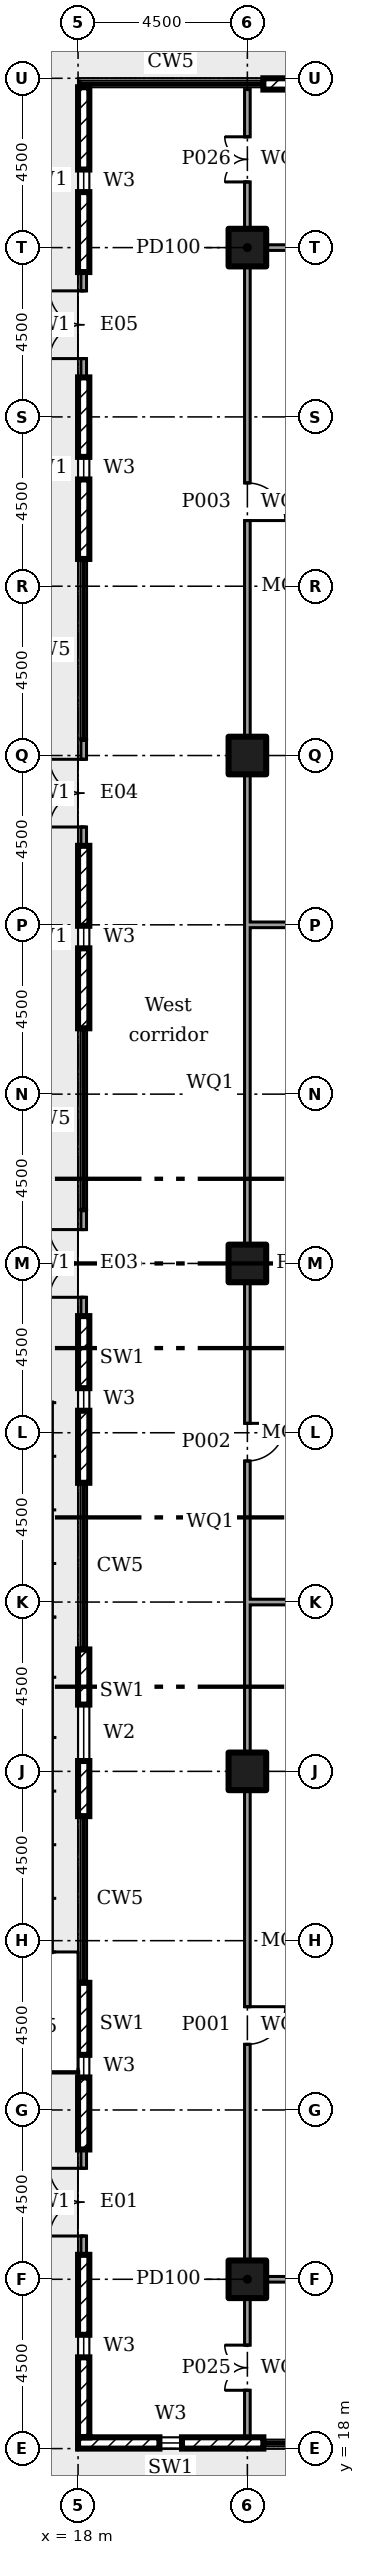
"""IFC4 building model, lengths in metres.
Left out: names, types, materials, properties, quantities, classifications, styles, units other than length and angle.
Written with IfcOpenShell. Run it as: python <this file> out.ifc"""

import sys

from ifc_helpers import new_model, si_unit, direction, frame, frame_2d, origin, origin_2d, place, context, subcontext, project, spatial, rectangle, extrude, element, fill, save


model = new_model("IFC4")
c1 = context("Model", 3, precision=1e-05, world=origin(), true_north=direction((0.0, 1.0)))
c2 = subcontext(c1, "Body", "Model", "MODEL_VIEW")
j1 = project(units=[si_unit("LENGTHUNIT", "METRE"), si_unit("PLANEANGLEUNIT", "RADIAN")], contexts=[c1])
p1 = place(None, origin())
s1 = spatial("IfcSite", under=j1, at=p1, CompositionType="ELEMENT")
p2 = place(p1, origin())
s2 = spatial("IfcBuilding", under=s1, at=p2, CompositionType="ELEMENT")
p3 = place(p2, frame((0.0, 0.0, 11.5)))
s3 = spatial("IfcBuildingStorey", under=s2, at=p3, CompositionType="ELEMENT", Elevation=11.5)
for number, where in (
    (1, (22.5, 22.5, 0.0)),
    (2, (22.5, 36.0, 0.0)),
    (3, (22.5, 49.5, 0.0)),
    (4, (22.5, 63.0, 0.0)),
    (5, (22.5, 76.5, 0.0)),
):
    element("IfcColumn", number, at=place(p3, frame(where)), inside=s3, PredefinedType="COLUMN", context=c2, shape_type="SweptSolid", body=[
        extrude(rectangle(XDim=1.0, YDim=1.0, at=origin_2d()), origin(), (0.0, 0.0, 1.0), 5.0),
    ])
p4 = place(p3, frame((18.0, 18.15, 0.0)))
e6 = element("IfcWall", 6, at=p4, inside=s3, PredefinedType="ELEMENTEDWALL", context=c2, shape_type="SweptSolid", body=[
    extrude(rectangle(XDim=4.925, YDim=0.3, at=frame_2d((2.462, 0.0))), origin(), (0.0, 0.0, 1.0), 4.55),
])
p5 = place(p4, frame((2.163, 0.0, 0.45)))
e7 = element("IfcOpeningElement", 7, at=p5, cuts=e6, PredefinedType="OPENING", context=c2, shape_type="SweptSolid", body=[
    extrude(rectangle(XDim=0.6, YDim=2.4, at=frame_2d((0.3, 1.2))), frame((0.0, 0.16, 0.0), z_axis=(0.0, -1.0, 0.0), x_axis=(1.0, 0.0, 0.0)), (0.0, 0.0, 1.0), 0.32),
])
p6 = place(p3, frame((27.85, 80.85, 0.0), z_axis=(0.0, 0.0, 1.0), x_axis=(-1.0, 0.0, 0.0)))
e8 = element("IfcWall", 8, at=p6, inside=s3, PredefinedType="ELEMENTEDWALL", context=c2, shape_type="SweptSolid", body=[
    extrude(rectangle(XDim=4.925, YDim=0.3, at=frame_2d((2.462, 0.0))), origin(), (0.0, 0.0, 1.0), 4.55),
])
p7 = place(p6, frame((2.163, 0.0, 0.45)))
e9 = element("IfcOpeningElement", 9, at=p7, cuts=e8, PredefinedType="OPENING", context=c2, shape_type="SweptSolid", body=[
    extrude(rectangle(XDim=0.6, YDim=2.4, at=frame_2d((0.3, 1.2))), frame((0.0, 0.16, 0.0), z_axis=(0.0, -1.0, 0.0), x_axis=(1.0, 0.0, 0.0)), (0.0, 0.0, 1.0), 0.32),
])
p8 = place(p3, frame((18.15, 80.762, 0.0), z_axis=(0.0, 0.0, 1.0), x_axis=(0.0, -1.0, 0.0)))
e10 = element("IfcWall", 10, at=p8, inside=s3, PredefinedType="ELEMENTEDWALL", context=c2, shape_type="SweptSolid", body=[
    extrude(rectangle(XDim=4.912, YDim=0.3, at=frame_2d((2.456, 0.0))), origin(), (0.0, 0.0, 1.0), 4.55),
])
p9 = place(p8, frame((2.188, 0.0, 0.45)))
e11 = element("IfcOpeningElement", 11, at=p9, cuts=e10, PredefinedType="OPENING", context=c2, shape_type="SweptSolid", body=[
    extrude(rectangle(XDim=0.6, YDim=2.4, at=frame_2d((0.3, 1.2))), frame((0.0, 0.16, 0.0), z_axis=(0.0, -1.0, 0.0), x_axis=(1.0, 0.0, 0.0)), (0.0, 0.0, 1.0), 0.32),
])
p10 = place(p3, frame((18.15, 75.85, 0.0), z_axis=(0.0, 0.0, 1.0), x_axis=(0.0, -1.0, 0.0)))
e12 = element("IfcWall", 12, at=p10, inside=s3, PredefinedType="SOLIDWALL", context=c2, shape_type="SweptSolid", body=[
    extrude(rectangle(XDim=2.8, YDim=0.15, at=frame_2d((1.4, 0.0))), origin(), (0.0, 0.0, 1.0), 4.55),
])
p11 = place(p10, frame((0.5, 0.0, 0.0)))
e13 = element("IfcOpeningElement", 13, at=p11, cuts=e12, PredefinedType="OPENING", context=c2, shape_type="SweptSolid", body=[
    extrude(rectangle(XDim=1.8, YDim=2.4, at=frame_2d((0.9, 1.2))), frame((0.0, 0.085, 0.0), z_axis=(0.0, -1.0, 0.0), x_axis=(1.0, 0.0, 0.0)), (0.0, 0.0, 1.0), 0.17),
])
p12 = place(p3, frame((18.15, 73.05, 0.0), z_axis=(0.0, 0.0, 1.0), x_axis=(0.0, -1.0, 0.0)))
e14 = element("IfcWall", 14, at=p12, inside=s3, PredefinedType="ELEMENTEDWALL", context=c2, shape_type="SweptSolid", body=[
    extrude(rectangle(XDim=4.825, YDim=0.3, at=frame_2d((2.413, 0.0))), origin(), (0.0, 0.0, 1.0), 4.55),
])
p13 = place(p12, frame((2.113, 0.0, 0.45)))
e15 = element("IfcOpeningElement", 15, at=p13, cuts=e14, PredefinedType="OPENING", context=c2, shape_type="SweptSolid", body=[
    extrude(rectangle(XDim=0.6, YDim=2.4, at=frame_2d((0.3, 1.2))), frame((0.0, 0.16, 0.0), z_axis=(0.0, -1.0, 0.0), x_axis=(1.0, 0.0, 0.0)), (0.0, 0.0, 1.0), 0.32),
])
p14 = place(p3, frame((18.15, 63.4, 0.0), z_axis=(0.0, 0.0, 1.0), x_axis=(0.0, -1.0, 0.0)))
e16 = element("IfcWall", 16, at=p14, inside=s3, PredefinedType="SOLIDWALL", context=c2, shape_type="SweptSolid", body=[
    extrude(rectangle(XDim=2.8, YDim=0.15, at=frame_2d((1.4, 0.0))), origin(), (0.0, 0.0, 1.0), 4.55),
])
p15 = place(p14, frame((0.5, 0.0, 0.0)))
e17 = element("IfcOpeningElement", 17, at=p15, cuts=e16, PredefinedType="OPENING", context=c2, shape_type="SweptSolid", body=[
    extrude(rectangle(XDim=1.8, YDim=2.4, at=frame_2d((0.9, 1.2))), frame((0.0, 0.085, 0.0), z_axis=(0.0, -1.0, 0.0), x_axis=(1.0, 0.0, 0.0)), (0.0, 0.0, 1.0), 0.17),
])
p16 = place(p3, frame((18.15, 60.6, 0.0), z_axis=(0.0, 0.0, 1.0), x_axis=(0.0, -1.0, 0.0)))
e18 = element("IfcWall", 18, at=p16, inside=s3, PredefinedType="ELEMENTEDWALL", context=c2, shape_type="SweptSolid", body=[
    extrude(rectangle(XDim=4.85, YDim=0.3, at=frame_2d((2.425, 0.0))), origin(), (0.0, 0.0, 1.0), 4.55),
])
p17 = place(p16, frame((2.125, 0.0, 0.45)))
e19 = element("IfcOpeningElement", 19, at=p17, cuts=e18, PredefinedType="OPENING", context=c2, shape_type="SweptSolid", body=[
    extrude(rectangle(XDim=0.6, YDim=2.4, at=frame_2d((0.3, 1.2))), frame((0.0, 0.16, 0.0), z_axis=(0.0, -1.0, 0.0), x_axis=(1.0, 0.0, 0.0)), (0.0, 0.0, 1.0), 0.32),
])
p18 = place(p3, frame((18.15, 50.9, 0.0), z_axis=(0.0, 0.0, 1.0), x_axis=(0.0, -1.0, 0.0)))
e20 = element("IfcWall", 20, at=p18, inside=s3, PredefinedType="SOLIDWALL", context=c2, shape_type="SweptSolid", body=[
    extrude(rectangle(XDim=2.8, YDim=0.15, at=frame_2d((1.4, 0.0))), origin(), (0.0, 0.0, 1.0), 4.55),
])
p19 = place(p18, frame((0.5, 0.0, 0.0)))
e21 = element("IfcOpeningElement", 21, at=p19, cuts=e20, PredefinedType="OPENING", context=c2, shape_type="SweptSolid", body=[
    extrude(rectangle(XDim=1.8, YDim=2.4, at=frame_2d((0.9, 1.2))), frame((0.0, 0.085, 0.0), z_axis=(0.0, -1.0, 0.0), x_axis=(1.0, 0.0, 0.0)), (0.0, 0.0, 1.0), 0.17),
])
p20 = place(p3, frame((18.15, 48.1, 0.0), z_axis=(0.0, 0.0, 1.0), x_axis=(0.0, -1.0, 0.0)))
e22 = element("IfcWall", 22, at=p20, inside=s3, PredefinedType="ELEMENTEDWALL", context=c2, shape_type="SweptSolid", body=[
    extrude(rectangle(XDim=4.43, YDim=0.3, at=frame_2d((2.215, 0.0))), origin(), (0.0, 0.0, 1.0), 4.55),
])
p21 = place(p20, frame((1.915, 0.0, 0.45)))
e23 = element("IfcOpeningElement", 23, at=p21, cuts=e22, PredefinedType="OPENING", context=c2, shape_type="SweptSolid", body=[
    extrude(rectangle(XDim=0.6, YDim=2.4, at=frame_2d((0.3, 1.2))), frame((0.0, 0.16, 0.0), z_axis=(0.0, -1.0, 0.0), x_axis=(1.0, 0.0, 0.0)), (0.0, 0.0, 1.0), 0.32),
])
p22 = place(p3, frame((18.15, 39.24, 0.0), z_axis=(0.0, 0.0, 1.0), x_axis=(0.0, -1.0, 0.0)))
e24 = element("IfcWall", 24, at=p22, inside=s3, PredefinedType="ELEMENTEDWALL", context=c2, shape_type="SweptSolid", body=[
    extrude(rectangle(XDim=4.43, YDim=0.3, at=frame_2d((2.215, 0.0))), origin(), (0.0, 0.0, 1.0), 4.55),
])
p23 = place(p22, frame((1.465, 0.0, 0.9)))
e25 = element("IfcOpeningElement", 25, at=p23, cuts=e24, PredefinedType="OPENING", context=c2, shape_type="SweptSolid", body=[
    extrude(rectangle(XDim=1.5, YDim=1.8, at=frame_2d((0.75, 0.9))), frame((0.0, 0.16, 0.0), z_axis=(0.0, -1.0, 0.0), x_axis=(1.0, 0.0, 0.0)), (0.0, 0.0, 1.0), 0.32),
])
p24 = place(p3, frame((18.15, 30.38, 0.0), z_axis=(0.0, 0.0, 1.0), x_axis=(0.0, -1.0, 0.0)))
e26 = element("IfcWall", 26, at=p24, inside=s3, PredefinedType="ELEMENTEDWALL", context=c2, shape_type="SweptSolid", body=[
    extrude(rectangle(XDim=4.43, YDim=0.3, at=frame_2d((2.215, 0.0))), origin(), (0.0, 0.0, 1.0), 4.55),
])
p25 = place(p24, frame((1.915, 0.0, 0.45)))
e27 = element("IfcOpeningElement", 27, at=p25, cuts=e26, PredefinedType="OPENING", context=c2, shape_type="SweptSolid", body=[
    extrude(rectangle(XDim=0.6, YDim=2.4, at=frame_2d((0.3, 1.2))), frame((0.0, 0.16, 0.0), z_axis=(0.0, -1.0, 0.0), x_axis=(1.0, 0.0, 0.0)), (0.0, 0.0, 1.0), 0.32),
])
p26 = place(p3, frame((18.15, 25.95, 0.0), z_axis=(0.0, 0.0, 1.0), x_axis=(0.0, -1.0, 0.0)))
e28 = element("IfcWall", 28, at=p26, inside=s3, PredefinedType="SOLIDWALL", context=c2, shape_type="SweptSolid", body=[
    extrude(rectangle(XDim=2.8, YDim=0.15, at=frame_2d((1.4, 0.0))), origin(), (0.0, 0.0, 1.0), 4.55),
])
p27 = place(p26, frame((0.5, 0.0, 0.0)))
e29 = element("IfcOpeningElement", 29, at=p27, cuts=e28, PredefinedType="OPENING", context=c2, shape_type="SweptSolid", body=[
    extrude(rectangle(XDim=1.8, YDim=2.4, at=frame_2d((0.9, 1.2))), frame((0.0, 0.085, 0.0), z_axis=(0.0, -1.0, 0.0), x_axis=(1.0, 0.0, 0.0)), (0.0, 0.0, 1.0), 0.17),
])
p28 = place(p3, frame((18.15, 23.15, 0.0), z_axis=(0.0, 0.0, 1.0), x_axis=(0.0, -1.0, 0.0)))
e30 = element("IfcWall", 30, at=p28, inside=s3, PredefinedType="ELEMENTEDWALL", context=c2, shape_type="SweptSolid", body=[
    extrude(rectangle(XDim=4.85, YDim=0.3, at=frame_2d((2.425, 0.0))), origin(), (0.0, 0.0, 1.0), 4.55),
])
p29 = place(p28, frame((2.125, 0.0, 0.45)))
e31 = element("IfcOpeningElement", 31, at=p29, cuts=e30, PredefinedType="OPENING", context=c2, shape_type="SweptSolid", body=[
    extrude(rectangle(XDim=0.6, YDim=2.4, at=frame_2d((0.3, 1.2))), frame((0.0, 0.16, 0.0), z_axis=(0.0, -1.0, 0.0), x_axis=(1.0, 0.0, 0.0)), (0.0, 0.0, 1.0), 0.32),
])
p30 = place(p3, frame((22.5, 18.3, 0.0), z_axis=(0.0, 0.0, 1.0), x_axis=(0.0, 1.0, 0.0)))
e32 = element("IfcWall", 32, at=p30, inside=s3, PredefinedType="PARTITIONING", context=c2, shape_type="SweptSolid", body=[
    extrude(rectangle(XDim=3.705, YDim=0.15, at=frame_2d((1.853, 0.0))), origin(), (0.0, 0.0, 1.0), 4.55),
])
p31 = place(p30, frame((1.25, 0.0, 0.0)))
e33 = element("IfcOpeningElement", 33, at=p31, cuts=e32, PredefinedType="OPENING", context=c2, shape_type="SweptSolid", body=[
    extrude(rectangle(XDim=1.2, YDim=2.1, at=frame_2d((0.6, 1.05))), frame((0.0, 0.085, 0.0), z_axis=(0.0, -1.0, 0.0), x_axis=(1.0, 0.0, 0.0)), (0.0, 0.0, 1.0), 0.17),
])
p32 = place(p3, frame((22.5, 76.995, 0.0), z_axis=(0.0, 0.0, 1.0), x_axis=(0.0, 1.0, 0.0)))
e34 = element("IfcWall", 34, at=p32, inside=s3, PredefinedType="PARTITIONING", context=c2, shape_type="SweptSolid", body=[
    extrude(rectangle(XDim=3.705, YDim=0.15, at=frame_2d((1.853, 0.0))), origin(), (0.0, 0.0, 1.0), 4.55),
])
p33 = place(p32, frame((1.25, 0.0, 0.0)))
e35 = element("IfcOpeningElement", 35, at=p33, cuts=e34, PredefinedType="OPENING", context=c2, shape_type="SweptSolid", body=[
    extrude(rectangle(XDim=1.2, YDim=2.1, at=frame_2d((0.6, 1.05))), frame((0.0, 0.085, 0.0), z_axis=(0.0, -1.0, 0.0), x_axis=(1.0, 0.0, 0.0)), (0.0, 0.0, 1.0), 0.17),
])
p34 = place(p3, frame((22.5, 22.995, 0.0), z_axis=(0.0, 0.0, 1.0), x_axis=(0.0, 1.0, 0.0)))
e36 = element("IfcWall", 36, at=p34, inside=s3, PredefinedType="PARTITIONING", context=c2, shape_type="SweptSolid", body=[
    extrude(rectangle(XDim=12.51, YDim=0.15, at=frame_2d((6.255, 0.0))), origin(), (0.0, 0.0, 1.0), 4.55),
])
p35 = place(p34, frame((5.75, 0.0, 0.0)))
e37 = element("IfcOpeningElement", 37, at=p35, cuts=e36, PredefinedType="OPENING", context=c2, shape_type="SweptSolid", body=[
    extrude(rectangle(XDim=1.0, YDim=2.1, at=frame_2d((0.5, 1.05))), frame((0.0, 0.085, 0.0), z_axis=(0.0, -1.0, 0.0), x_axis=(1.0, 0.0, 0.0)), (0.0, 0.0, 1.0), 0.17),
])
p36 = place(p3, frame((22.5, 36.495, 0.0), z_axis=(0.0, 0.0, 1.0), x_axis=(0.0, 1.0, 0.0)))
e38 = element("IfcWall", 38, at=p36, inside=s3, PredefinedType="PARTITIONING", context=c2, shape_type="SweptSolid", body=[
    extrude(rectangle(XDim=4.08, YDim=0.15, at=frame_2d((2.04, 0.0))), origin(), (0.0, 0.0, 1.0), 4.55),
])
p37 = place(p3, frame((22.5, 40.5, 0.0), z_axis=(0.0, 0.0, 1.0), x_axis=(0.0, 1.0, 0.0)))
e39 = element("IfcWall", 39, at=p37, inside=s3, PredefinedType="PARTITIONING", context=c2, shape_type="SweptSolid", body=[
    extrude(rectangle(XDim=8.505, YDim=0.15, at=frame_2d((4.252, 0.0))), origin(), (0.0, 0.0, 1.0), 4.55),
])
p38 = place(p37, frame((3.75, 0.0, 0.0)))
e40 = element("IfcOpeningElement", 40, at=p38, cuts=e39, PredefinedType="OPENING", context=c2, shape_type="SweptSolid", body=[
    extrude(rectangle(XDim=1.0, YDim=2.1, at=frame_2d((0.5, 1.05))), frame((0.0, 0.085, 0.0), z_axis=(0.0, -1.0, 0.0), x_axis=(1.0, 0.0, 0.0)), (0.0, 0.0, 1.0), 0.17),
])
p39 = place(p3, frame((22.5, 49.995, 0.0), z_axis=(0.0, 0.0, 1.0), x_axis=(0.0, 1.0, 0.0)))
e41 = element("IfcWall", 41, at=p39, inside=s3, PredefinedType="PARTITIONING", context=c2, shape_type="SweptSolid", body=[
    extrude(rectangle(XDim=8.58, YDim=0.15, at=frame_2d((4.29, 0.0))), origin(), (0.0, 0.0, 1.0), 4.55),
])
p40 = place(p3, frame((22.5, 58.5, 0.0), z_axis=(0.0, 0.0, 1.0), x_axis=(0.0, 1.0, 0.0)))
e42 = element("IfcWall", 42, at=p40, inside=s3, PredefinedType="PARTITIONING", context=c2, shape_type="SweptSolid", body=[
    extrude(rectangle(XDim=4.005, YDim=0.15, at=frame_2d((2.002, 0.0))), origin(), (0.0, 0.0, 1.0), 4.55),
])
p41 = place(p3, frame((22.5, 63.495, 0.0), z_axis=(0.0, 0.0, 1.0), x_axis=(0.0, 1.0, 0.0)))
e43 = element("IfcWall", 43, at=p41, inside=s3, PredefinedType="PARTITIONING", context=c2, shape_type="SweptSolid", body=[
    extrude(rectangle(XDim=12.51, YDim=0.15, at=frame_2d((6.255, 0.0))), origin(), (0.0, 0.0, 1.0), 4.55),
])
p42 = place(p41, frame((5.75, 0.0, 0.0)))
e44 = element("IfcOpeningElement", 44, at=p42, cuts=e43, PredefinedType="OPENING", context=c2, shape_type="SweptSolid", body=[
    extrude(rectangle(XDim=1.0, YDim=2.1, at=frame_2d((0.5, 1.05))), frame((0.0, 0.085, 0.0), z_axis=(0.0, -1.0, 0.0), x_axis=(1.0, 0.0, 0.0)), (0.0, 0.0, 1.0), 0.17),
])
for number, where in (
    (45, (22.995, 22.5, 0.0)),
    (46, (22.995, 76.5, 0.0)),
):
    element("IfcWall", number, at=place(p3, frame(where)), inside=s3, PredefinedType="PARTITIONING", context=c2, shape_type="SweptSolid", body=[
        extrude(rectangle(XDim=4.08, YDim=0.15, at=frame_2d((2.04, 0.0))), origin(), (0.0, 0.0, 1.0), 4.55),
    ])
p43 = place(p3, frame((22.575, 40.5, 0.0)))
e47 = element("IfcWall", 47, at=p43, inside=s3, PredefinedType="PARTITIONING", context=c2, shape_type="SweptSolid", body=[
    extrude(rectangle(XDim=4.5, YDim=0.15, at=frame_2d((2.25, 0.0))), origin(), (0.0, 0.0, 1.0), 4.55),
])
p44 = place(p3, frame((22.575, 58.5, 0.0)))
e48 = element("IfcWall", 48, at=p44, inside=s3, PredefinedType="PARTITIONING", context=c2, shape_type="SweptSolid", body=[
    extrude(rectangle(XDim=3.13, YDim=0.15, at=frame_2d((1.565, 0.0))), origin(), (0.0, 0.0, 1.0), 4.55),
])
p45 = place(p5, origin())
e49 = element("IfcWindow", 49, at=p45, inside=s3, PartitioningType="SINGLE_PANEL", PredefinedType="WINDOW", context=c2, shape_type="SweptSolid", body=[
    extrude(rectangle(XDim=0.6, YDim=2.4, at=frame_2d((0.3, 1.2))), frame((0.0, 0.03, 0.0), z_axis=(0.0, -1.0, 0.0), x_axis=(1.0, 0.0, 0.0)), (0.0, 0.0, 1.0), 0.06),
])
fill(e7, e49)
p46 = place(p9, origin())
e50 = element("IfcWindow", 50, at=p46, inside=s3, PartitioningType="SINGLE_PANEL", PredefinedType="WINDOW", context=c2, shape_type="SweptSolid", body=[
    extrude(rectangle(XDim=0.6, YDim=2.4, at=frame_2d((0.3, 1.2))), frame((0.0, 0.03, 0.0), z_axis=(0.0, -1.0, 0.0), x_axis=(1.0, 0.0, 0.0)), (0.0, 0.0, 1.0), 0.06),
])
fill(e11, e50)
p47 = place(p11, frame((1.8, 0.0, 0.0), x_axis=(-1.0, 0.0, 0.0)))
e51 = element("IfcDoor", 51, at=p47, inside=s3, OperationType="DOUBLE_DOOR_DOUBLE_SWING", PredefinedType="NOTDEFINED", context=c2, shape_type="SweptSolid", body=[
    extrude(rectangle(XDim=1.8, YDim=2.4, at=frame_2d((0.9, 1.2))), frame((0.0, 0.025, 0.0), z_axis=(0.0, -1.0, 0.0), x_axis=(1.0, 0.0, 0.0)), (0.0, 0.0, 1.0), 0.05),
])
fill(e13, e51)
p48 = place(p13, origin())
e52 = element("IfcWindow", 52, at=p48, inside=s3, PartitioningType="SINGLE_PANEL", PredefinedType="WINDOW", context=c2, shape_type="SweptSolid", body=[
    extrude(rectangle(XDim=0.6, YDim=2.4, at=frame_2d((0.3, 1.2))), frame((0.0, 0.03, 0.0), z_axis=(0.0, -1.0, 0.0), x_axis=(1.0, 0.0, 0.0)), (0.0, 0.0, 1.0), 0.06),
])
fill(e15, e52)
p49 = place(p15, frame((1.8, 0.0, 0.0), x_axis=(-1.0, 0.0, 0.0)))
e53 = element("IfcDoor", 53, at=p49, inside=s3, OperationType="DOUBLE_DOOR_DOUBLE_SWING", PredefinedType="NOTDEFINED", context=c2, shape_type="SweptSolid", body=[
    extrude(rectangle(XDim=1.8, YDim=2.4, at=frame_2d((0.9, 1.2))), frame((0.0, 0.025, 0.0), z_axis=(0.0, -1.0, 0.0), x_axis=(1.0, 0.0, 0.0)), (0.0, 0.0, 1.0), 0.05),
])
fill(e17, e53)
p50 = place(p17, origin())
e54 = element("IfcWindow", 54, at=p50, inside=s3, PartitioningType="SINGLE_PANEL", PredefinedType="WINDOW", context=c2, shape_type="SweptSolid", body=[
    extrude(rectangle(XDim=0.6, YDim=2.4, at=frame_2d((0.3, 1.2))), frame((0.0, 0.03, 0.0), z_axis=(0.0, -1.0, 0.0), x_axis=(1.0, 0.0, 0.0)), (0.0, 0.0, 1.0), 0.06),
])
fill(e19, e54)
p51 = place(p19, frame((1.8, 0.0, 0.0), x_axis=(-1.0, 0.0, 0.0)))
e55 = element("IfcDoor", 55, at=p51, inside=s3, OperationType="DOUBLE_DOOR_DOUBLE_SWING", PredefinedType="NOTDEFINED", context=c2, shape_type="SweptSolid", body=[
    extrude(rectangle(XDim=1.8, YDim=2.4, at=frame_2d((0.9, 1.2))), frame((0.0, 0.025, 0.0), z_axis=(0.0, -1.0, 0.0), x_axis=(1.0, 0.0, 0.0)), (0.0, 0.0, 1.0), 0.05),
])
fill(e21, e55)
p52 = place(p21, origin())
e56 = element("IfcWindow", 56, at=p52, inside=s3, PartitioningType="SINGLE_PANEL", PredefinedType="WINDOW", context=c2, shape_type="SweptSolid", body=[
    extrude(rectangle(XDim=0.6, YDim=2.4, at=frame_2d((0.3, 1.2))), frame((0.0, 0.03, 0.0), z_axis=(0.0, -1.0, 0.0), x_axis=(1.0, 0.0, 0.0)), (0.0, 0.0, 1.0), 0.06),
])
fill(e23, e56)
p53 = place(p23, origin())
e57 = element("IfcWindow", 57, at=p53, inside=s3, PartitioningType="SINGLE_PANEL", PredefinedType="WINDOW", context=c2, shape_type="SweptSolid", body=[
    extrude(rectangle(XDim=1.5, YDim=1.8, at=frame_2d((0.75, 0.9))), frame((0.0, 0.03, 0.0), z_axis=(0.0, -1.0, 0.0), x_axis=(1.0, 0.0, 0.0)), (0.0, 0.0, 1.0), 0.06),
])
fill(e25, e57)
p54 = place(p25, origin())
e58 = element("IfcWindow", 58, at=p54, inside=s3, PartitioningType="SINGLE_PANEL", PredefinedType="WINDOW", context=c2, shape_type="SweptSolid", body=[
    extrude(rectangle(XDim=0.6, YDim=2.4, at=frame_2d((0.3, 1.2))), frame((0.0, 0.03, 0.0), z_axis=(0.0, -1.0, 0.0), x_axis=(1.0, 0.0, 0.0)), (0.0, 0.0, 1.0), 0.06),
])
fill(e27, e58)
p55 = place(p27, frame((1.8, 0.0, 0.0), x_axis=(-1.0, 0.0, 0.0)))
e59 = element("IfcDoor", 59, at=p55, inside=s3, OperationType="DOUBLE_DOOR_DOUBLE_SWING", PredefinedType="NOTDEFINED", context=c2, shape_type="SweptSolid", body=[
    extrude(rectangle(XDim=1.8, YDim=2.4, at=frame_2d((0.9, 1.2))), frame((0.0, 0.025, 0.0), z_axis=(0.0, -1.0, 0.0), x_axis=(1.0, 0.0, 0.0)), (0.0, 0.0, 1.0), 0.05),
])
fill(e29, e59)
p56 = place(p29, origin())
e60 = element("IfcWindow", 60, at=p56, inside=s3, PartitioningType="SINGLE_PANEL", PredefinedType="WINDOW", context=c2, shape_type="SweptSolid", body=[
    extrude(rectangle(XDim=0.6, YDim=2.4, at=frame_2d((0.3, 1.2))), frame((0.0, 0.03, 0.0), z_axis=(0.0, -1.0, 0.0), x_axis=(1.0, 0.0, 0.0)), (0.0, 0.0, 1.0), 0.06),
])
fill(e31, e60)
p57 = place(p35, frame((1.0, 0.0, 0.0), x_axis=(-1.0, 0.0, 0.0)))
e61 = element("IfcDoor", 61, at=p57, inside=s3, OperationType="SINGLE_SWING_RIGHT", PredefinedType="DOOR", context=c2, shape_type="SweptSolid", body=[
    extrude(rectangle(XDim=1.0, YDim=2.1, at=frame_2d((0.5, 1.05))), frame((0.0, 0.025, 0.0), z_axis=(0.0, -1.0, 0.0), x_axis=(1.0, 0.0, 0.0)), (0.0, 0.0, 1.0), 0.05),
])
fill(e37, e61)
p58 = place(p38, frame((1.0, 0.0, 0.0), x_axis=(-1.0, 0.0, 0.0)))
e62 = element("IfcDoor", 62, at=p58, inside=s3, OperationType="SINGLE_SWING_RIGHT", PredefinedType="DOOR", context=c2, shape_type="SweptSolid", body=[
    extrude(rectangle(XDim=1.0, YDim=2.1, at=frame_2d((0.5, 1.05))), frame((0.0, 0.025, 0.0), z_axis=(0.0, -1.0, 0.0), x_axis=(1.0, 0.0, 0.0)), (0.0, 0.0, 1.0), 0.05),
])
fill(e40, e62)
p59 = place(p42, frame((1.0, 0.0, 0.0), x_axis=(-1.0, 0.0, 0.0)))
e63 = element("IfcDoor", 63, at=p59, inside=s3, OperationType="SINGLE_SWING_LEFT", PredefinedType="DOOR", context=c2, shape_type="SweptSolid", body=[
    extrude(rectangle(XDim=1.0, YDim=2.1, at=frame_2d((0.5, 1.05))), frame((0.0, 0.025, 0.0), z_axis=(0.0, -1.0, 0.0), x_axis=(1.0, 0.0, 0.0)), (0.0, 0.0, 1.0), 0.05),
])
fill(e44, e63)
p60 = place(p31, origin())
e64 = element("IfcDoor", 64, at=p60, inside=s3, OperationType="DOUBLE_DOOR_SINGLE_SWING", PredefinedType="DOOR", context=c2, shape_type="SweptSolid", body=[
    extrude(rectangle(XDim=1.2, YDim=2.1, at=frame_2d((0.6, 1.05))), frame((0.0, 0.025, 0.0), z_axis=(0.0, -1.0, 0.0), x_axis=(1.0, 0.0, 0.0)), (0.0, 0.0, 1.0), 0.05),
])
fill(e33, e64)
p61 = place(p33, origin())
e65 = element("IfcDoor", 65, at=p61, inside=s3, OperationType="DOUBLE_DOOR_SINGLE_SWING", PredefinedType="DOOR", context=c2, shape_type="SweptSolid", body=[
    extrude(rectangle(XDim=1.2, YDim=2.1, at=frame_2d((0.6, 1.05))), frame((0.0, 0.025, 0.0), z_axis=(0.0, -1.0, 0.0), x_axis=(1.0, 0.0, 0.0)), (0.0, 0.0, 1.0), 0.05),
])
fill(e35, e65)
save(model, sys.argv[1])
